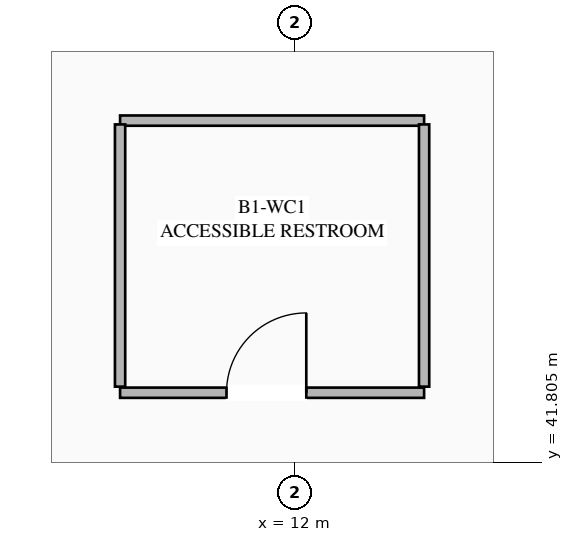
"""IFC4 building model, lengths in metres.
Left out: names, types, materials, properties, quantities, classifications, styles, units other than length and angle.
Written with IfcOpenShell. Run it as: python <this file> out.ifc"""

import sys

from ifc_helpers import new_model, si_unit, direction, frame, frame_2d, origin, place, context, subcontext, project, spatial, rectangle, extrude, element, fill, save


model = new_model("IFC4")
c1 = context("Model", 3, precision=1e-05, world=origin(), true_north=direction((0.0, 1.0)))
c2 = subcontext(c1, "Body", "Model", "MODEL_VIEW")
j1 = project(units=[si_unit("LENGTHUNIT", "METRE"), si_unit("PLANEANGLEUNIT", "RADIAN")], contexts=[c1])
p1 = place(None, origin())
s1 = spatial("IfcSite", under=j1, at=p1, CompositionType="ELEMENT")
p2 = place(p1, origin())
s2 = spatial("IfcBuilding", under=s1, at=p2, CompositionType="ELEMENT")
p3 = place(p2, frame((0.0, 0.0, -5.5)))
s3 = spatial("IfcBuildingStorey", under=s2, at=p3, CompositionType="ELEMENT", Elevation=-5.5)
p4 = place(p3, frame((9.7, 42.72, 0.0), z_axis=(0.0, 0.0, 1.0), x_axis=(1.0, 0.0, 0.0)))
e1 = element("IfcWall", 1, at=p4, inside=s3, PredefinedType="PARTITIONING", context=c2, shape_type="SweptSolid", body=[
    extrude(rectangle(XDim=4.0, YDim=0.135, at=frame_2d((2.0, 0.0))), origin(), (0.0, 0.0, 1.0), 4.243),
])
p5 = place(p4, frame((1.4, 0.0, 0.0)))
e2 = element("IfcOpeningElement", 2, at=p5, cuts=e1, PredefinedType="OPENING", context=c2, shape_type="SweptSolid", body=[
    extrude(rectangle(XDim=1.05, YDim=2.2, at=frame_2d((0.525, 1.1))), frame((0.0, 0.077, 0.0), z_axis=(0.0, -1.0, 0.0), x_axis=(1.0, 0.0, 0.0)), (0.0, 0.0, 1.0), 0.155),
])
p6 = place(p3, frame((9.7, 46.3, 0.0), z_axis=(0.0, 0.0, 1.0), x_axis=(1.0, 0.0, 0.0)))
e3 = element("IfcWall", 3, at=p6, inside=s3, PredefinedType="PARTITIONING", context=c2, shape_type="SweptSolid", body=[
    extrude(rectangle(XDim=4.0, YDim=0.135, at=frame_2d((2.0, 0.0))), origin(), (0.0, 0.0, 1.0), 4.243),
])
for number, where, z_axis, x_axis in (
    (4, (9.7, 42.8, 0.0), (0.0, 0.0, 1.0), (0.0, 1.0, 0.0)),
    (5, (13.7, 42.8, 0.0), (0.0, 0.0, 1.0), (0.0, 1.0, 0.0)),
):
    element("IfcWall", number, at=place(p3, frame(where, z_axis=z_axis, x_axis=x_axis)), inside=s3, PredefinedType="PARTITIONING", context=c2, shape_type="SweptSolid", body=[
        extrude(rectangle(XDim=3.45, YDim=0.135, at=frame_2d((1.725, 0.0))), origin(), (0.0, 0.0, 1.0), 4.243),
    ])
p7 = place(p5, origin())
e6 = element("IfcDoor", 6, at=p7, inside=s3, OperationType="SINGLE_SWING_RIGHT", PredefinedType="DOOR", context=c2, shape_type="SweptSolid", body=[
    extrude(rectangle(XDim=1.05, YDim=2.2, at=frame_2d((0.525, 1.1))), frame((0.0, 0.025, 0.0), z_axis=(0.0, -1.0, 0.0), x_axis=(1.0, 0.0, 0.0)), (0.0, 0.0, 1.0), 0.05),
])
fill(e2, e6)
save(model, sys.argv[1])
